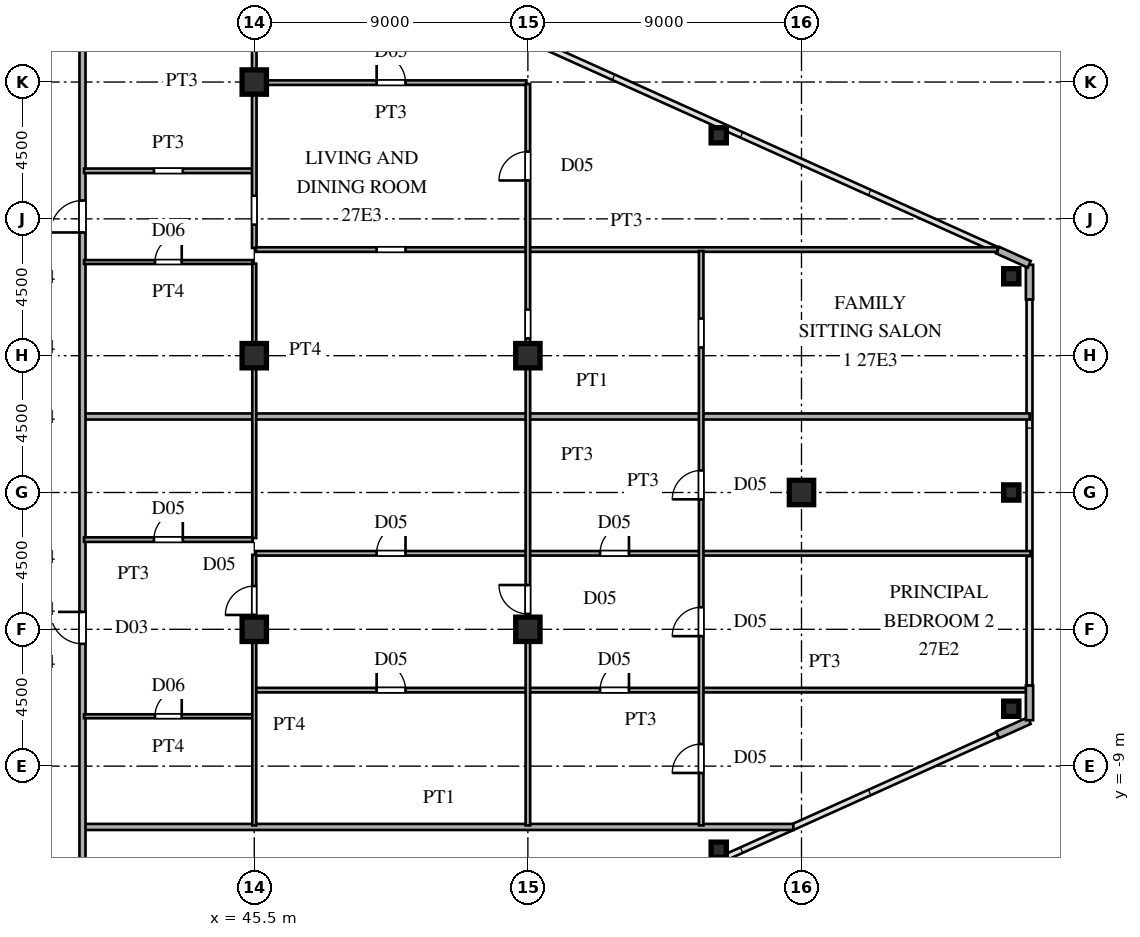
"""IFC4 building model, lengths in metres.
Left out: names, types, materials, properties, quantities, classifications, styles, units other than length and angle.
Written with IfcOpenShell. Run it as: python <this file> out.ifc"""

import sys

from ifc_helpers import new_model, si_unit, direction, frame, frame_2d, origin, origin_2d, place, context, subcontext, project, spatial, rectangle, hollow_rectangle, i_section, extrude, source, transform, mapped, element, fill, save


model = new_model("IFC4")
c1 = context("Model", 3, precision=1e-05, world=origin(), true_north=direction((0.0, 1.0)))
c2 = subcontext(c1, "Body", "Model", "MODEL_VIEW")
j1 = project(units=[si_unit("LENGTHUNIT", "METRE"), si_unit("PLANEANGLEUNIT", "RADIAN")], contexts=[c1])
p1 = place(None, origin())
s1 = spatial("IfcSite", under=j1, at=p1, CompositionType="ELEMENT")
p2 = place(p1, origin())
s2 = spatial("IfcBuilding", under=s1, at=p2, CompositionType="ELEMENT")
p3 = place(p2, frame((0.0, 0.0, 103.2)))
s3 = spatial("IfcBuildingStorey", under=s2, at=p3, CompositionType="ELEMENT", Elevation=103.2)
m1 = source(origin(), c2, "Body", "SweptSolid", [
    extrude(i_section(OverallWidth=0.8, OverallDepth=0.8, WebThickness=0.032, FlangeThickness=0.05, at=origin_2d()), origin(), (0.0, 0.0, 1.0), 3.6),
])
for number, where, z_axis, x_axis in (
    (1, (45.5, -4.5, 0.0), (0.0, 0.0, 1.0), (1.0, 0.0, 0.0)),
    (2, (45.5, 4.5, 0.0), (0.0, 0.0, 1.0), (1.0, 0.0, 0.0)),
    (3, (45.5, 13.5, 0.0), (0.0, 0.0, 1.0), (1.0, 0.0, 0.0)),
    (4, (54.5, -4.5, 0.0), (0.0, 0.0, 1.0), (1.0, 0.0, 0.0)),
    (5, (54.5, 4.5, 0.0), (0.0, 0.0, 1.0), (1.0, 0.0, 0.0)),
    (6, (63.5, 0.0, 0.0), (0.0, 0.0, 1.0), (1.0, 0.0, 0.0)),
):
    element("IfcColumn", number, at=place(p3, frame(where, z_axis=z_axis, x_axis=x_axis)), inside=s3, PredefinedType="COLUMN", context=c2, shape_type="MappedRepresentation", body=[
        mapped(m1, transform((0.0, 0.0, 0.0), scale=1.0)),
    ])
m2 = source(origin(), c2, "Body", "SweptSolid", [
    extrude(hollow_rectangle(XDim=0.5, YDim=0.5, WallThickness=0.02, at=origin_2d()), origin(), (0.0, 0.0, 1.0), 3.6),
])
for number, where, z_axis, x_axis in (
    (7, (70.4, -7.112, 0.0), (0.0, 0.0, 1.0), (1.0, 0.0, 0.0)),
    (8, (70.4, 7.112, 0.0), (0.0, 0.0, 1.0), (1.0, 0.0, 0.0)),
    (9, (60.778, -11.749, 0.0), (0.0, 0.0, 1.0), (1.0, 0.0, 0.0)),
    (10, (60.778, 11.749, 0.0), (0.0, 0.0, 1.0), (1.0, 0.0, 0.0)),
    (11, (70.4, 0.0, 0.0), (0.0, 0.0, 1.0), (1.0, 0.0, 0.0)),
):
    element("IfcColumn", number, at=place(p3, frame(where, z_axis=z_axis, x_axis=x_axis)), inside=s3, PredefinedType="COLUMN", context=c2, shape_type="MappedRepresentation", body=[
        mapped(m2, transform((0.0, 0.0, 0.0), scale=1.0)),
    ])
for number, where, z_axis, x_axis in (
    (12, (69.951, -7.972, 0.0), (0.0, 0.0, 1.0), (0.912, 0.41, 0.0)),
    (13, (71.0, -7.49, 0.0), (0.0, 0.0, 1.0), (0.0, 1.0, 0.0)),
    (14, (71.0, 6.35, 0.0), (0.0, 0.0, 1.0), (0.0, 1.0, 0.0)),
    (15, (70.991, 7.504, 0.0), (0.0, 0.0, 1.0), (-0.912, 0.41, 0.0)),
):
    element("IfcWall", number, at=place(p3, frame(where, z_axis=z_axis, x_axis=x_axis)), inside=s3, PredefinedType="SOLIDWALL", context=c2, shape_type="SweptSolid", body=[
        extrude(rectangle(XDim=1.14, YDim=0.24, at=frame_2d((0.57, 0.0))), origin(), (0.0, 0.0, 1.0), 3.38),
    ])
p4 = place(p3, frame((39.93, -11.0, 0.0), z_axis=(0.0, 0.0, 1.0), x_axis=(1.0, 0.0, 0.0)))
e16 = element("IfcWall", 16, at=p4, inside=s3, PredefinedType="PARTITIONING", context=c2, shape_type="SweptSolid", body=[
    extrude(rectangle(XDim=23.304, YDim=0.2, at=frame_2d((11.652, 0.0))), origin(), (0.0, 0.0, 1.0), 3.38),
])
p5 = place(p3, frame((39.9, -7.36, 0.0), z_axis=(0.0, 0.0, 1.0), x_axis=(1.0, 0.0, 0.0)))
e17 = element("IfcWall", 17, at=p5, inside=s3, PredefinedType="PARTITIONING", context=c2, shape_type="SweptSolid", body=[
    extrude(rectangle(XDim=5.55, YDim=0.13, at=frame_2d((2.775, 0.0))), origin(), (0.0, 0.0, 1.0), 3.38),
])
p6 = place(p5, frame((2.335, 0.0, 0.0)))
e18 = element("IfcOpeningElement", 18, at=p6, cuts=e17, PredefinedType="OPENING", context=c2, shape_type="SweptSolid", body=[
    extrude(rectangle(XDim=0.88, YDim=2.1, at=frame_2d((0.44, 1.05))), frame((0.0, 0.075, 0.0), z_axis=(0.0, -1.0, 0.0), x_axis=(1.0, 0.0, 0.0)), (0.0, 0.0, 1.0), 0.15),
])
p7 = place(p3, frame((45.55, -6.5, 0.0), z_axis=(0.0, 0.0, 1.0), x_axis=(1.0, 0.0, 0.0)))
e19 = element("IfcWall", 19, at=p7, inside=s3, PredefinedType="PARTITIONING", context=c2, shape_type="SweptSolid", body=[
    extrude(rectangle(XDim=25.325, YDim=0.15, at=frame_2d((12.663, 0.0))), origin(), (0.0, 0.0, 1.0), 3.38),
])
p8 = place(p7, frame((3.975, 0.0, 0.0)))
e20 = element("IfcOpeningElement", 20, at=p8, cuts=e19, PredefinedType="OPENING", context=c2, shape_type="SweptSolid", body=[
    extrude(rectangle(XDim=0.95, YDim=2.15, at=frame_2d((0.475, 1.075))), frame((0.0, 0.085, 0.0), z_axis=(0.0, -1.0, 0.0), x_axis=(1.0, 0.0, 0.0)), (0.0, 0.0, 1.0), 0.17),
])
p9 = place(p7, frame((11.325, 0.0, 0.0)))
e21 = element("IfcOpeningElement", 21, at=p9, cuts=e19, PredefinedType="OPENING", context=c2, shape_type="SweptSolid", body=[
    extrude(rectangle(XDim=0.95, YDim=2.15, at=frame_2d((0.475, 1.075))), frame((0.0, 0.085, 0.0), z_axis=(0.0, -1.0, 0.0), x_axis=(1.0, 0.0, 0.0)), (0.0, 0.0, 1.0), 0.17),
])
p10 = place(p3, frame((45.55, -2.0, 0.0), z_axis=(0.0, 0.0, 1.0), x_axis=(1.0, 0.0, 0.0)))
e22 = element("IfcWall", 22, at=p10, inside=s3, PredefinedType="PARTITIONING", context=c2, shape_type="SweptSolid", body=[
    extrude(rectangle(XDim=25.485, YDim=0.15, at=frame_2d((12.742, 0.0))), origin(), (0.0, 0.0, 1.0), 3.38),
])
p11 = place(p10, frame((3.975, 0.0, 0.0)))
e23 = element("IfcOpeningElement", 23, at=p11, cuts=e22, PredefinedType="OPENING", context=c2, shape_type="SweptSolid", body=[
    extrude(rectangle(XDim=0.95, YDim=2.15, at=frame_2d((0.475, 1.075))), frame((0.0, 0.085, 0.0), z_axis=(0.0, -1.0, 0.0), x_axis=(1.0, 0.0, 0.0)), (0.0, 0.0, 1.0), 0.17),
])
p12 = place(p10, frame((11.325, 0.0, 0.0)))
e24 = element("IfcOpeningElement", 24, at=p12, cuts=e22, PredefinedType="OPENING", context=c2, shape_type="SweptSolid", body=[
    extrude(rectangle(XDim=0.95, YDim=2.15, at=frame_2d((0.475, 1.075))), frame((0.0, 0.085, 0.0), z_axis=(0.0, -1.0, 0.0), x_axis=(1.0, 0.0, 0.0)), (0.0, 0.0, 1.0), 0.17),
])
p13 = place(p3, frame((39.9, -1.55, 0.0), z_axis=(0.0, 0.0, 1.0), x_axis=(1.0, 0.0, 0.0)))
e25 = element("IfcWall", 25, at=p13, inside=s3, PredefinedType="PARTITIONING", context=c2, shape_type="SweptSolid", body=[
    extrude(rectangle(XDim=5.55, YDim=0.15, at=frame_2d((2.775, 0.0))), origin(), (0.0, 0.0, 1.0), 3.38),
])
p14 = place(p13, frame((2.3, 0.0, 0.0)))
e26 = element("IfcOpeningElement", 26, at=p14, cuts=e25, PredefinedType="OPENING", context=c2, shape_type="SweptSolid", body=[
    extrude(rectangle(XDim=0.95, YDim=2.15, at=frame_2d((0.475, 1.075))), frame((0.0, 0.085, 0.0), z_axis=(0.0, -1.0, 0.0), x_axis=(1.0, 0.0, 0.0)), (0.0, 0.0, 1.0), 0.17),
])
p15 = place(p3, frame((39.93, 2.5, 0.0), z_axis=(0.0, 0.0, 1.0), x_axis=(1.0, 0.0, 0.0)))
e27 = element("IfcWall", 27, at=p15, inside=s3, PredefinedType="PARTITIONING", context=c2, shape_type="SweptSolid", body=[
    extrude(rectangle(XDim=31.075, YDim=0.2, at=frame_2d((15.538, 0.0))), origin(), (0.0, 0.0, 1.0), 3.38),
])
p16 = place(p3, frame((39.9, 7.58, 0.0), z_axis=(0.0, 0.0, 1.0), x_axis=(1.0, 0.0, 0.0)))
e28 = element("IfcWall", 28, at=p16, inside=s3, PredefinedType="PARTITIONING", context=c2, shape_type="SweptSolid", body=[
    extrude(rectangle(XDim=5.55, YDim=0.13, at=frame_2d((2.775, 0.0))), origin(), (0.0, 0.0, 1.0), 3.38),
])
p17 = place(p16, frame((2.335, 0.0, 0.0)))
e29 = element("IfcOpeningElement", 29, at=p17, cuts=e28, PredefinedType="OPENING", context=c2, shape_type="SweptSolid", body=[
    extrude(rectangle(XDim=0.88, YDim=2.1, at=frame_2d((0.44, 1.05))), frame((0.0, 0.075, 0.0), z_axis=(0.0, -1.0, 0.0), x_axis=(1.0, 0.0, 0.0)), (0.0, 0.0, 1.0), 0.15),
])
p18 = place(p3, frame((45.55, 7.99, 0.0), z_axis=(0.0, 0.0, 1.0), x_axis=(1.0, 0.0, 0.0)))
e30 = element("IfcWall", 30, at=p18, inside=s3, PredefinedType="PARTITIONING", context=c2, shape_type="SweptSolid", body=[
    extrude(rectangle(XDim=24.392, YDim=0.15, at=frame_2d((12.196, 0.0))), origin(), (0.0, 0.0, 1.0), 3.38),
])
p19 = place(p18, frame((3.975, 0.0, 0.0)))
e31 = element("IfcOpeningElement", 31, at=p19, cuts=e30, PredefinedType="OPENING", context=c2, shape_type="SweptSolid", body=[
    extrude(rectangle(XDim=0.95, YDim=2.15, at=frame_2d((0.475, 1.075))), frame((0.0, 0.085, 0.0), z_axis=(0.0, -1.0, 0.0), x_axis=(1.0, 0.0, 0.0)), (0.0, 0.0, 1.0), 0.17),
])
p20 = place(p3, frame((39.9, 10.58, 0.0), z_axis=(0.0, 0.0, 1.0), x_axis=(1.0, 0.0, 0.0)))
e32 = element("IfcWall", 32, at=p20, inside=s3, PredefinedType="PARTITIONING", context=c2, shape_type="SweptSolid", body=[
    extrude(rectangle(XDim=5.55, YDim=0.15, at=frame_2d((2.775, 0.0))), origin(), (0.0, 0.0, 1.0), 3.38),
])
p21 = place(p20, frame((2.3, 0.0, 0.0)))
e33 = element("IfcOpeningElement", 33, at=p21, cuts=e32, PredefinedType="OPENING", context=c2, shape_type="SweptSolid", body=[
    extrude(rectangle(XDim=0.95, YDim=2.15, at=frame_2d((0.475, 1.075))), frame((0.0, 0.085, 0.0), z_axis=(0.0, -1.0, 0.0), x_axis=(1.0, 0.0, 0.0)), (0.0, 0.0, 1.0), 0.17),
])
p22 = place(p3, frame((45.55, 13.48, 0.0), z_axis=(0.0, 0.0, 1.0), x_axis=(1.0, 0.0, 0.0)))
e34 = element("IfcWall", 34, at=p22, inside=s3, PredefinedType="PARTITIONING", context=c2, shape_type="SweptSolid", body=[
    extrude(rectangle(XDim=8.9, YDim=0.15, at=frame_2d((4.45, 0.0))), origin(), (0.0, 0.0, 1.0), 3.38),
])
p23 = place(p22, frame((3.975, 0.0, 0.0)))
e35 = element("IfcOpeningElement", 35, at=p23, cuts=e34, PredefinedType="OPENING", context=c2, shape_type="SweptSolid", body=[
    extrude(rectangle(XDim=0.95, YDim=2.15, at=frame_2d((0.475, 1.075))), frame((0.0, 0.085, 0.0), z_axis=(0.0, -1.0, 0.0), x_axis=(1.0, 0.0, 0.0)), (0.0, 0.0, 1.0), 0.17),
])
p24 = place(p3, frame((39.85, -15.515, 0.0), z_axis=(0.0, 0.0, 1.0), x_axis=(0.0, 1.0, 0.0)))
e36 = element("IfcWall", 36, at=p24, inside=s3, PredefinedType="PARTITIONING", context=c2, shape_type="SweptSolid", body=[
    extrude(rectangle(XDim=31.03, YDim=0.2, at=frame_2d((15.515, 0.0))), origin(), (0.0, 0.0, 1.0), 3.38),
])
p25 = place(p24, frame((1.69, 0.0, 0.0)))
e37 = element("IfcOpeningElement", 37, at=p25, cuts=e36, PredefinedType="OPENING", context=c2, shape_type="SweptSolid", body=[
    extrude(rectangle(XDim=1.05, YDim=2.25, at=frame_2d((0.525, 1.125))), frame((0.0, 0.11, 0.0), z_axis=(0.0, -1.0, 0.0), x_axis=(1.0, 0.0, 0.0)), (0.0, 0.0, 1.0), 0.22),
])
p26 = place(p24, frame((10.538, 0.0, 0.0)))
e38 = element("IfcOpeningElement", 38, at=p26, cuts=e36, PredefinedType="OPENING", context=c2, shape_type="SweptSolid", body=[
    extrude(rectangle(XDim=1.05, YDim=2.25, at=frame_2d((0.525, 1.125))), frame((0.0, 0.11, 0.0), z_axis=(0.0, -1.0, 0.0), x_axis=(1.0, 0.0, 0.0)), (0.0, 0.0, 1.0), 0.22),
])
p27 = place(p24, frame((24.067, 0.0, 0.0)))
e39 = element("IfcOpeningElement", 39, at=p27, cuts=e36, PredefinedType="OPENING", context=c2, shape_type="SweptSolid", body=[
    extrude(rectangle(XDim=1.05, YDim=2.25, at=frame_2d((0.525, 1.125))), frame((0.0, 0.11, 0.0), z_axis=(0.0, -1.0, 0.0), x_axis=(1.0, 0.0, 0.0)), (0.0, 0.0, 1.0), 0.22),
])
p28 = place(p3, frame((45.5, -10.95, 0.0), z_axis=(0.0, 0.0, 1.0), x_axis=(0.0, 1.0, 0.0)))
e40 = element("IfcWall", 40, at=p28, inside=s3, PredefinedType="PARTITIONING", context=c2, shape_type="SweptSolid", body=[
    extrude(rectangle(XDim=8.9, YDim=0.13, at=frame_2d((4.45, 0.0))), origin(), (0.0, 0.0, 1.0), 2.68),
])
p29 = place(p28, frame((6.923, 0.0, 0.0)))
e41 = element("IfcOpeningElement", 41, at=p29, cuts=e40, PredefinedType="OPENING", context=c2, shape_type="SweptSolid", body=[
    extrude(rectangle(XDim=0.95, YDim=2.15, at=frame_2d((0.475, 1.075))), frame((0.0, 0.075, 0.0), z_axis=(0.0, -1.0, 0.0), x_axis=(1.0, 0.0, 0.0)), (0.0, 0.0, 1.0), 0.15),
])
p30 = place(p3, frame((45.5, -1.498, 0.0), z_axis=(0.0, 0.0, 1.0), x_axis=(0.0, 1.0, 0.0)))
e42 = element("IfcWall", 42, at=p30, inside=s3, PredefinedType="PARTITIONING", context=c2, shape_type="SweptSolid", body=[
    extrude(rectangle(XDim=9.025, YDim=0.13, at=frame_2d((4.513, 0.0))), origin(), (0.0, 0.0, 1.0), 2.68),
])
p31 = place(p3, frame((45.5, 8.042, 0.0), z_axis=(0.0, 0.0, 1.0), x_axis=(0.0, 1.0, 0.0)))
e43 = element("IfcWall", 43, at=p31, inside=s3, PredefinedType="PARTITIONING", context=c2, shape_type="SweptSolid", body=[
    extrude(rectangle(XDim=10.968, YDim=0.15, at=frame_2d((5.484, 0.0))), origin(), (0.0, 0.0, 1.0), 2.68),
])
p32 = place(p31, frame((0.768, 0.0, 0.0)))
e44 = element("IfcOpeningElement", 44, at=p32, cuts=e43, PredefinedType="OPENING", context=c2, shape_type="SweptSolid", body=[
    extrude(rectangle(XDim=0.95, YDim=2.15, at=frame_2d((0.475, 1.075))), frame((0.0, 0.085, 0.0), z_axis=(0.0, -1.0, 0.0), x_axis=(1.0, 0.0, 0.0)), (0.0, 0.0, 1.0), 0.17),
])
p33 = place(p3, frame((54.5, -10.95, 0.0), z_axis=(0.0, 0.0, 1.0), x_axis=(0.0, 1.0, 0.0)))
e45 = element("IfcWall", 45, at=p33, inside=s3, PredefinedType="PARTITIONING", context=c2, shape_type="SweptSolid", body=[
    extrude(rectangle(XDim=24.383, YDim=0.15, at=frame_2d((12.191, 0.0))), origin(), (0.0, 0.0, 1.0), 2.68),
])
p34 = place(p33, frame((6.957, 0.0, 0.0)))
e46 = element("IfcOpeningElement", 46, at=p34, cuts=e45, PredefinedType="OPENING", context=c2, shape_type="SweptSolid", body=[
    extrude(rectangle(XDim=0.95, YDim=2.15, at=frame_2d((0.475, 1.075))), frame((0.0, 0.085, 0.0), z_axis=(0.0, -1.0, 0.0), x_axis=(1.0, 0.0, 0.0)), (0.0, 0.0, 1.0), 0.17),
])
p35 = place(p33, frame((21.212, 0.0, 0.0)))
e47 = element("IfcOpeningElement", 47, at=p35, cuts=e45, PredefinedType="OPENING", context=c2, shape_type="SweptSolid", body=[
    extrude(rectangle(XDim=0.95, YDim=2.15, at=frame_2d((0.475, 1.075))), frame((0.0, 0.085, 0.0), z_axis=(0.0, -1.0, 0.0), x_axis=(1.0, 0.0, 0.0)), (0.0, 0.0, 1.0), 0.17),
])
p36 = place(p33, frame((16.018, 0.0, 0.0)))
e48 = element("IfcOpeningElement", 48, at=p36, cuts=e45, PredefinedType="OPENING", context=c2, shape_type="SweptSolid", body=[
    extrude(rectangle(XDim=0.95, YDim=2.15, at=frame_2d((0.475, 1.075))), frame((0.0, 0.085, 0.0), z_axis=(0.0, -1.0, 0.0), x_axis=(1.0, 0.0, 0.0)), (0.0, 0.0, 1.0), 0.17),
])
p37 = place(p3, frame((60.2, -10.95, 0.0), z_axis=(0.0, 0.0, 1.0), x_axis=(0.0, 1.0, 0.0)))
e49 = element("IfcWall", 49, at=p37, inside=s3, PredefinedType="PARTITIONING", context=c2, shape_type="SweptSolid", body=[
    extrude(rectangle(XDim=18.892, YDim=0.15, at=frame_2d((9.446, 0.0))), origin(), (0.0, 0.0, 1.0), 3.38),
])
p38 = place(p37, frame((1.725, 0.0, 0.0)))
e50 = element("IfcOpeningElement", 50, at=p38, cuts=e49, PredefinedType="OPENING", context=c2, shape_type="SweptSolid", body=[
    extrude(rectangle(XDim=0.95, YDim=2.15, at=frame_2d((0.475, 1.075))), frame((0.0, 0.085, 0.0), z_axis=(0.0, -1.0, 0.0), x_axis=(1.0, 0.0, 0.0)), (0.0, 0.0, 1.0), 0.17),
])
p39 = place(p37, frame((6.225, 0.0, 0.0)))
e51 = element("IfcOpeningElement", 51, at=p39, cuts=e49, PredefinedType="OPENING", context=c2, shape_type="SweptSolid", body=[
    extrude(rectangle(XDim=0.95, YDim=2.15, at=frame_2d((0.475, 1.075))), frame((0.0, 0.085, 0.0), z_axis=(0.0, -1.0, 0.0), x_axis=(1.0, 0.0, 0.0)), (0.0, 0.0, 1.0), 0.17),
])
p40 = place(p37, frame((10.725, 0.0, 0.0)))
e52 = element("IfcOpeningElement", 52, at=p40, cuts=e49, PredefinedType="OPENING", context=c2, shape_type="SweptSolid", body=[
    extrude(rectangle(XDim=0.95, YDim=2.15, at=frame_2d((0.475, 1.075))), frame((0.0, 0.085, 0.0), z_axis=(0.0, -1.0, 0.0), x_axis=(1.0, 0.0, 0.0)), (0.0, 0.0, 1.0), 0.17),
])
p41 = place(p37, frame((15.721, 0.0, 0.0)))
e53 = element("IfcOpeningElement", 53, at=p41, cuts=e49, PredefinedType="OPENING", context=c2, shape_type="SweptSolid", body=[
    extrude(rectangle(XDim=0.95, YDim=2.15, at=frame_2d((0.475, 1.075))), frame((0.0, 0.085, 0.0), z_axis=(0.0, -1.0, 0.0), x_axis=(1.0, 0.0, 0.0)), (0.0, 0.0, 1.0), 0.17),
])
m3 = source(origin(), c2, "Body", "SweptSolid", [
    extrude(rectangle(XDim=0.88, YDim=2.1, at=frame_2d((0.44, 1.05))), frame((0.0, 0.025, 0.0), z_axis=(0.0, -1.0, 0.0), x_axis=(1.0, 0.0, 0.0)), (0.0, 0.0, 1.0), 0.05),
])
p42 = place(p6, origin())
e54 = element("IfcDoor", 54, at=p42, inside=s3, OperationType="SINGLE_SWING_RIGHT", PredefinedType="DOOR", context=c2, shape_type="MappedRepresentation", body=[
    mapped(m3, transform((0.0, 0.0, 0.0), scale=1.0)),
])
fill(e18, e54)
m4 = source(origin(), c2, "Body", "SweptSolid", [
    extrude(rectangle(XDim=0.95, YDim=2.15, at=frame_2d((0.475, 1.075))), frame((0.0, 0.025, 0.0), z_axis=(0.0, -1.0, 0.0), x_axis=(1.0, 0.0, 0.0)), (0.0, 0.0, 1.0), 0.05),
])
p43 = place(p8, origin())
e55 = element("IfcDoor", 55, at=p43, inside=s3, OperationType="SINGLE_SWING_LEFT", PredefinedType="DOOR", context=c2, shape_type="MappedRepresentation", body=[
    mapped(m4, transform((0.0, 0.0, 0.0), scale=1.0)),
])
fill(e20, e55)
p44 = place(p9, origin())
e56 = element("IfcDoor", 56, at=p44, inside=s3, OperationType="SINGLE_SWING_RIGHT", PredefinedType="DOOR", context=c2, shape_type="MappedRepresentation", body=[
    mapped(m4, transform((0.0, 0.0, 0.0), scale=1.0)),
])
fill(e21, e56)
p45 = place(p11, origin())
e57 = element("IfcDoor", 57, at=p45, inside=s3, OperationType="SINGLE_SWING_RIGHT", PredefinedType="DOOR", context=c2, shape_type="MappedRepresentation", body=[
    mapped(m4, transform((0.0, 0.0, 0.0), scale=1.0)),
])
fill(e23, e57)
p46 = place(p12, origin())
e58 = element("IfcDoor", 58, at=p46, inside=s3, OperationType="SINGLE_SWING_RIGHT", PredefinedType="DOOR", context=c2, shape_type="MappedRepresentation", body=[
    mapped(m4, transform((0.0, 0.0, 0.0), scale=1.0)),
])
fill(e24, e58)
p47 = place(p14, origin())
e59 = element("IfcDoor", 59, at=p47, inside=s3, OperationType="SINGLE_SWING_RIGHT", PredefinedType="DOOR", context=c2, shape_type="MappedRepresentation", body=[
    mapped(m4, transform((0.0, 0.0, 0.0), scale=1.0)),
])
fill(e26, e59)
p48 = place(p17, origin())
e60 = element("IfcDoor", 60, at=p48, inside=s3, OperationType="SINGLE_SWING_RIGHT", PredefinedType="DOOR", context=c2, shape_type="MappedRepresentation", body=[
    mapped(m3, transform((0.0, 0.0, 0.0), scale=1.0)),
])
fill(e29, e60)
p49 = place(p23, origin())
e61 = element("IfcDoor", 61, at=p49, inside=s3, OperationType="SINGLE_SWING_LEFT", PredefinedType="DOOR", context=c2, shape_type="MappedRepresentation", body=[
    mapped(m4, transform((0.0, 0.0, 0.0), scale=1.0)),
])
fill(e35, e61)
m5 = source(origin(), c2, "Body", "SweptSolid", [
    extrude(rectangle(XDim=1.05, YDim=2.25, at=frame_2d((0.525, 1.125))), frame((0.0, 0.025, 0.0), z_axis=(0.0, -1.0, 0.0), x_axis=(1.0, 0.0, 0.0)), (0.0, 0.0, 1.0), 0.05),
])
p50 = place(p26, origin())
e62 = element("IfcDoor", 62, at=p50, inside=s3, OperationType="SINGLE_SWING_RIGHT", PredefinedType="DOOR", context=c2, shape_type="MappedRepresentation", body=[
    mapped(m5, transform((0.0, 0.0, 0.0), scale=1.0)),
])
fill(e38, e62)
p51 = place(p27, origin())
e63 = element("IfcDoor", 63, at=p51, inside=s3, OperationType="SINGLE_SWING_LEFT", PredefinedType="DOOR", context=c2, shape_type="MappedRepresentation", body=[
    mapped(m5, transform((0.0, 0.0, 0.0), scale=1.0)),
])
fill(e39, e63)
p52 = place(p29, origin())
e64 = element("IfcDoor", 64, at=p52, inside=s3, OperationType="SINGLE_SWING_LEFT", PredefinedType="DOOR", context=c2, shape_type="MappedRepresentation", body=[
    mapped(m4, transform((0.0, 0.0, 0.0), scale=1.0)),
])
fill(e41, e64)
p53 = place(p34, origin())
e65 = element("IfcDoor", 65, at=p53, inside=s3, OperationType="SINGLE_SWING_RIGHT", PredefinedType="DOOR", context=c2, shape_type="MappedRepresentation", body=[
    mapped(m4, transform((0.0, 0.0, 0.0), scale=1.0)),
])
fill(e46, e65)
p54 = place(p35, origin())
e66 = element("IfcDoor", 66, at=p54, inside=s3, OperationType="SINGLE_SWING_LEFT", PredefinedType="DOOR", context=c2, shape_type="MappedRepresentation", body=[
    mapped(m4, transform((0.0, 0.0, 0.0), scale=1.0)),
])
fill(e47, e66)
p55 = place(p38, origin())
e67 = element("IfcDoor", 67, at=p55, inside=s3, OperationType="SINGLE_SWING_LEFT", PredefinedType="DOOR", context=c2, shape_type="MappedRepresentation", body=[
    mapped(m4, transform((0.0, 0.0, 0.0), scale=1.0)),
])
fill(e50, e67)
p56 = place(p39, origin())
e68 = element("IfcDoor", 68, at=p56, inside=s3, OperationType="SINGLE_SWING_LEFT", PredefinedType="DOOR", context=c2, shape_type="MappedRepresentation", body=[
    mapped(m4, transform((0.0, 0.0, 0.0), scale=1.0)),
])
fill(e51, e68)
p57 = place(p40, origin())
e69 = element("IfcDoor", 69, at=p57, inside=s3, OperationType="SINGLE_SWING_LEFT", PredefinedType="DOOR", context=c2, shape_type="MappedRepresentation", body=[
    mapped(m4, transform((0.0, 0.0, 0.0), scale=1.0)),
])
fill(e52, e69)
save(model, sys.argv[1])
